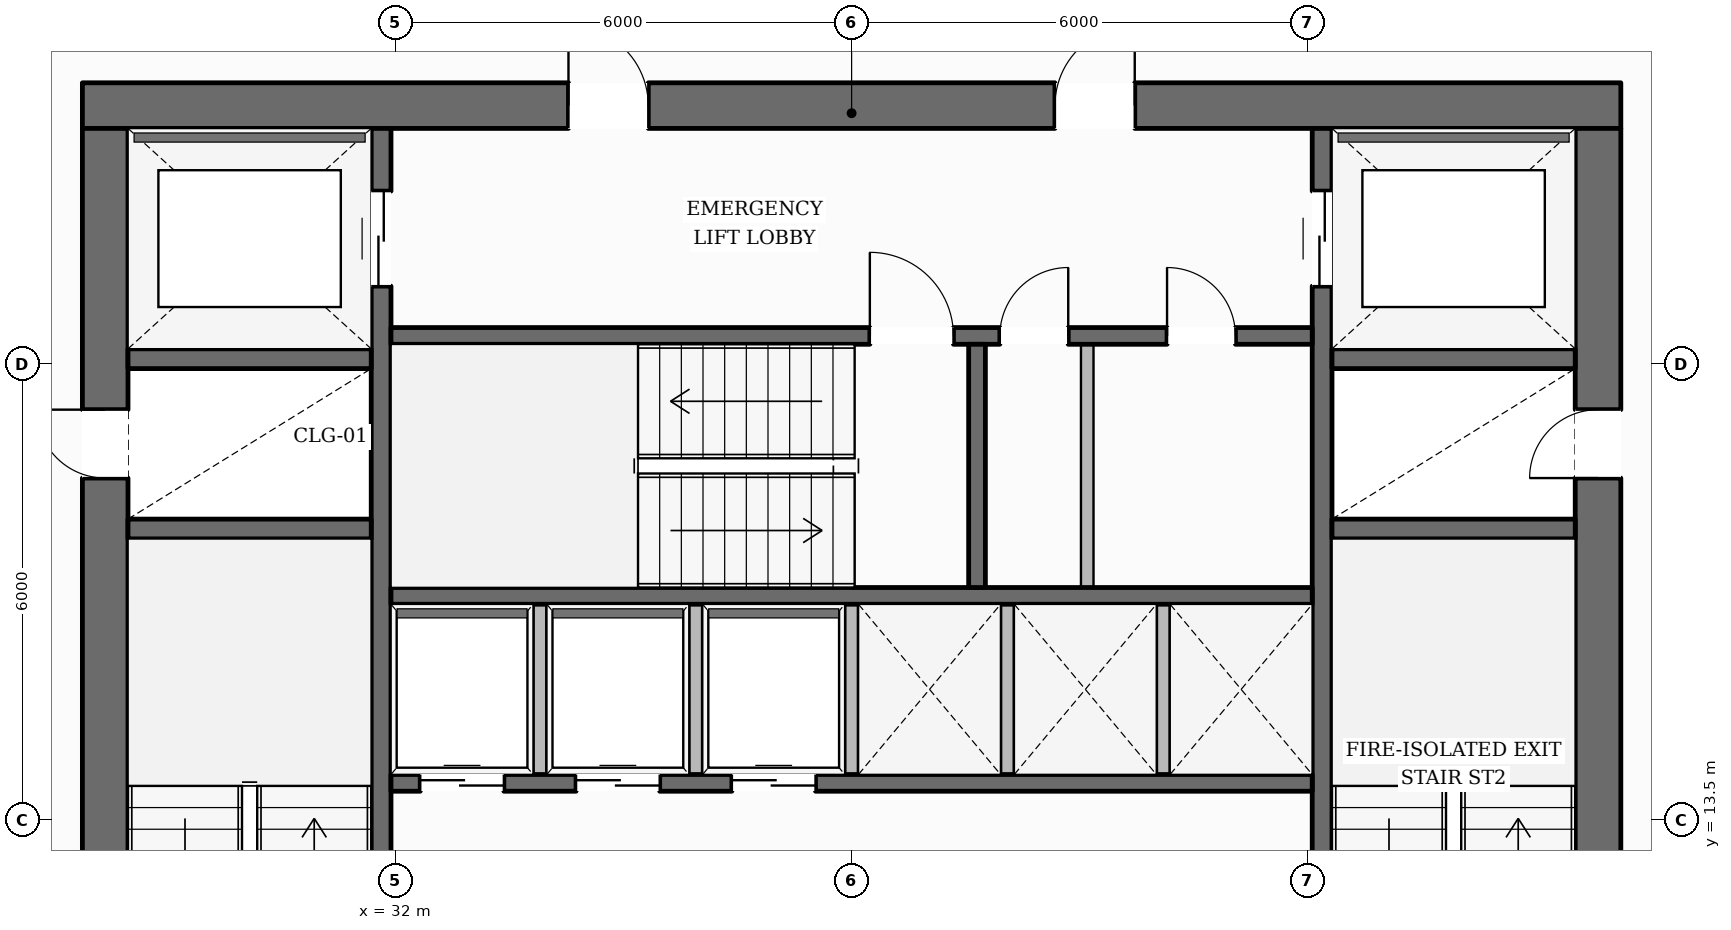
"""IFC4 building model, lengths in metres.
Left out: names, types, materials, properties, quantities, classifications, styles, units other than length and angle.
Written with IfcOpenShell. Run it as: python <this file> out.ifc"""

import sys

from ifc_helpers import new_model, si_unit, direction, frame, frame_2d, origin, place, context, subcontext, project, spatial, rectangle, extrude, element, fill, save


model = new_model("IFC4")
c1 = context("Model", 3, precision=1e-05, world=origin(), true_north=direction((0.0, 1.0)))
c2 = subcontext(c1, "Body", "Model", "MODEL_VIEW")
j1 = project(units=[si_unit("LENGTHUNIT", "METRE"), si_unit("PLANEANGLEUNIT", "RADIAN")], contexts=[c1])
p1 = place(None, origin())
s1 = spatial("IfcSite", under=j1, at=p1, CompositionType="ELEMENT")
p2 = place(p1, origin())
s2 = spatial("IfcBuilding", under=s1, at=p2, CompositionType="ELEMENT")
p3 = place(p2, frame((0.0, 0.0, 48.35)))
s3 = spatial("IfcBuildingStorey", under=s2, at=p3, CompositionType="ELEMENT", Elevation=48.35)
p4 = place(p3, frame((27.88, 22.9, 0.0), z_axis=(0.0, 0.0, 1.0), x_axis=(1.0, 0.0, 0.0)))
e1 = element("IfcWall", 1, at=p4, inside=s3, PredefinedType="SOLIDWALL", context=c2, shape_type="SweptSolid", body=[
    extrude(rectangle(XDim=20.24, YDim=0.6, at=frame_2d((10.12, 0.0))), origin(), (0.0, 0.0, 1.0), 3.59),
])
p5 = place(p4, frame((6.395, 0.0, 0.0)))
e2 = element("IfcOpeningElement", 2, at=p5, cuts=e1, PredefinedType="OPENING", context=c2, shape_type="SweptSolid", body=[
    extrude(rectangle(XDim=1.05, YDim=2.15, at=frame_2d((0.525, 1.075))), frame((0.0, 0.31, 0.0), z_axis=(0.0, -1.0, 0.0), x_axis=(1.0, 0.0, 0.0)), (0.0, 0.0, 1.0), 0.62),
])
p6 = place(p4, frame((12.795, 0.0, 0.0)))
e3 = element("IfcOpeningElement", 3, at=p6, cuts=e1, PredefinedType="OPENING", context=c2, shape_type="SweptSolid", body=[
    extrude(rectangle(XDim=1.05, YDim=2.15, at=frame_2d((0.525, 1.075))), frame((0.0, 0.31, 0.0), z_axis=(0.0, -1.0, 0.0), x_axis=(1.0, 0.0, 0.0)), (0.0, 0.0, 1.0), 0.62),
])
p7 = place(p3, frame((28.18, 9.6, 0.0), z_axis=(0.0, 0.0, 1.0), x_axis=(0.0, 1.0, 0.0)))
e4 = element("IfcWall", 4, at=p7, inside=s3, PredefinedType="SOLIDWALL", context=c2, shape_type="SweptSolid", body=[
    extrude(rectangle(XDim=13.0, YDim=0.6, at=frame_2d((6.5, 0.0))), origin(), (0.0, 0.0, 1.0), 3.59),
])
p8 = place(p7, frame((0.2, 0.0, 0.0)))
e5 = element("IfcOpeningElement", 5, at=p8, cuts=e4, PredefinedType="OPENING", context=c2, shape_type="SweptSolid", body=[
    extrude(rectangle(XDim=1.1, YDim=2.15, at=frame_2d((0.55, 1.075))), frame((0.0, 0.31, 0.0), z_axis=(0.0, -1.0, 0.0), x_axis=(1.0, 0.0, 0.0)), (0.0, 0.0, 1.0), 0.62),
])
p9 = place(p7, frame((8.4, 0.0, 0.0)))
e6 = element("IfcOpeningElement", 6, at=p9, cuts=e4, PredefinedType="OPENING", context=c2, shape_type="SweptSolid", body=[
    extrude(rectangle(XDim=0.9, YDim=2.1, at=frame_2d((0.45, 1.05))), frame((0.0, 0.31, 0.0), z_axis=(0.0, -1.0, 0.0), x_axis=(1.0, 0.0, 0.0)), (0.0, 0.0, 1.0), 0.62),
])
p10 = place(p3, frame((47.82, 9.6, 0.0), z_axis=(0.0, 0.0, 1.0), x_axis=(0.0, 1.0, 0.0)))
e7 = element("IfcWall", 7, at=p10, inside=s3, PredefinedType="SOLIDWALL", context=c2, shape_type="SweptSolid", body=[
    extrude(rectangle(XDim=13.0, YDim=0.6, at=frame_2d((6.5, 0.0))), origin(), (0.0, 0.0, 1.0), 3.59),
])
p11 = place(p10, frame((0.2, 0.0, 0.0)))
e8 = element("IfcOpeningElement", 8, at=p11, cuts=e7, PredefinedType="OPENING", context=c2, shape_type="SweptSolid", body=[
    extrude(rectangle(XDim=1.1, YDim=2.15, at=frame_2d((0.55, 1.075))), frame((0.0, 0.31, 0.0), z_axis=(0.0, -1.0, 0.0), x_axis=(1.0, 0.0, 0.0)), (0.0, 0.0, 1.0), 0.62),
])
p12 = place(p10, frame((8.4, 0.0, 0.0)))
e9 = element("IfcOpeningElement", 9, at=p12, cuts=e7, PredefinedType="OPENING", context=c2, shape_type="SweptSolid", body=[
    extrude(rectangle(XDim=0.9, YDim=2.1, at=frame_2d((0.45, 1.05))), frame((0.0, 0.31, 0.0), z_axis=(0.0, -1.0, 0.0), x_axis=(1.0, 0.0, 0.0)), (0.0, 0.0, 1.0), 0.62),
])
p13 = place(p3, frame((31.81, 9.6, 0.0), z_axis=(0.0, 0.0, 1.0), x_axis=(0.0, 1.0, 0.0)))
e10 = element("IfcWall", 10, at=p13, inside=s3, PredefinedType="SHEAR", context=c2, shape_type="SweptSolid", body=[
    extrude(rectangle(XDim=13.0, YDim=0.26, at=frame_2d((6.5, 0.0))), origin(), (0.0, 0.0, 1.0), 3.59),
])
p14 = place(p13, frame((10.925, 0.0, 0.0)))
e11 = element("IfcOpeningElement", 11, at=p14, cuts=e10, PredefinedType="OPENING", context=c2, shape_type="SweptSolid", body=[
    extrude(rectangle(XDim=1.25, YDim=2.25, at=frame_2d((0.625, 1.125))), frame((0.0, 0.14, 0.0), z_axis=(0.0, -1.0, 0.0), x_axis=(1.0, 0.0, 0.0)), (0.0, 0.0, 1.0), 0.28),
])
p15 = place(p3, frame((44.19, 9.6, 0.0), z_axis=(0.0, 0.0, 1.0), x_axis=(0.0, 1.0, 0.0)))
e12 = element("IfcWall", 12, at=p15, inside=s3, PredefinedType="SHEAR", context=c2, shape_type="SweptSolid", body=[
    extrude(rectangle(XDim=13.0, YDim=0.26, at=frame_2d((6.5, 0.0))), origin(), (0.0, 0.0, 1.0), 3.59),
])
p16 = place(p15, frame((10.925, 0.0, 0.0)))
e13 = element("IfcOpeningElement", 13, at=p16, cuts=e12, PredefinedType="OPENING", context=c2, shape_type="SweptSolid", body=[
    extrude(rectangle(XDim=1.25, YDim=2.25, at=frame_2d((0.625, 1.125))), frame((0.0, 0.14, 0.0), z_axis=(0.0, -1.0, 0.0), x_axis=(1.0, 0.0, 0.0)), (0.0, 0.0, 1.0), 0.28),
])
for number, where, z_axis, x_axis in (
    (14, (28.48, 17.33, 0.0), (0.0, 0.0, 1.0), (1.0, 0.0, 0.0)),
    (15, (28.48, 19.57, 0.0), (0.0, 0.0, 1.0), (1.0, 0.0, 0.0)),
    (16, (44.32, 17.33, 0.0), (0.0, 0.0, 1.0), (1.0, 0.0, 0.0)),
    (17, (44.32, 19.57, 0.0), (0.0, 0.0, 1.0), (1.0, 0.0, 0.0)),
):
    element("IfcWall", number, at=place(p3, frame(where, z_axis=z_axis, x_axis=x_axis)), inside=s3, PredefinedType="SHEAR", context=c2, shape_type="SweptSolid", body=[
        extrude(rectangle(XDim=3.2, YDim=0.26, at=frame_2d((1.6, 0.0))), origin(), (0.0, 0.0, 1.0), 3.59),
    ])
p17 = place(p3, frame((31.94, 19.87, 0.0), z_axis=(0.0, 0.0, 1.0), x_axis=(1.0, 0.0, 0.0)))
e18 = element("IfcWall", 18, at=p17, inside=s3, PredefinedType="SOLIDWALL", context=c2, shape_type="SweptSolid", body=[
    extrude(rectangle(XDim=12.12, YDim=0.22, at=frame_2d((6.06, 0.0))), origin(), (0.0, 0.0, 1.0), 3.59),
])
p18 = place(p17, frame((6.3, 0.0, 0.0)))
e19 = element("IfcOpeningElement", 19, at=p18, cuts=e18, PredefinedType="OPENING", context=c2, shape_type="SweptSolid", body=[
    extrude(rectangle(XDim=1.1, YDim=2.15, at=frame_2d((0.55, 1.075))), frame((0.0, 0.12, 0.0), z_axis=(0.0, -1.0, 0.0), x_axis=(1.0, 0.0, 0.0)), (0.0, 0.0, 1.0), 0.24),
])
p19 = place(p17, frame((8.01, 0.0, 0.0)))
e20 = element("IfcOpeningElement", 20, at=p19, cuts=e18, PredefinedType="OPENING", context=c2, shape_type="SweptSolid", body=[
    extrude(rectangle(XDim=0.9, YDim=2.1, at=frame_2d((0.45, 1.05))), frame((0.0, 0.12, 0.0), z_axis=(0.0, -1.0, 0.0), x_axis=(1.0, 0.0, 0.0)), (0.0, 0.0, 1.0), 0.24),
])
p20 = place(p17, frame((10.21, 0.0, 0.0)))
e21 = element("IfcOpeningElement", 21, at=p20, cuts=e18, PredefinedType="OPENING", context=c2, shape_type="SweptSolid", body=[
    extrude(rectangle(XDim=0.9, YDim=2.1, at=frame_2d((0.45, 1.05))), frame((0.0, 0.12, 0.0), z_axis=(0.0, -1.0, 0.0), x_axis=(1.0, 0.0, 0.0)), (0.0, 0.0, 1.0), 0.24),
])
p21 = place(p3, frame((31.94, 16.45, 0.0), z_axis=(0.0, 0.0, 1.0), x_axis=(1.0, 0.0, 0.0)))
e22 = element("IfcWall", 22, at=p21, inside=s3, PredefinedType="SOLIDWALL", context=c2, shape_type="SweptSolid", body=[
    extrude(rectangle(XDim=12.12, YDim=0.22, at=frame_2d((6.06, 0.0))), origin(), (0.0, 0.0, 1.0), 3.59),
])
p22 = place(p3, frame((39.65, 16.56, 0.0), z_axis=(0.0, 0.0, 1.0), x_axis=(0.0, 1.0, 0.0)))
e23 = element("IfcWall", 23, at=p22, inside=s3, PredefinedType="SOLIDWALL", context=c2, shape_type="SweptSolid", body=[
    extrude(rectangle(XDim=3.2, YDim=0.22, at=frame_2d((1.6, 0.0))), origin(), (0.0, 0.0, 1.0), 3.59),
])
p23 = place(p3, frame((31.94, 13.99, 0.0), z_axis=(0.0, 0.0, 1.0), x_axis=(1.0, 0.0, 0.0)))
e24 = element("IfcWall", 24, at=p23, inside=s3, PredefinedType="SOLIDWALL", context=c2, shape_type="SweptSolid", body=[
    extrude(rectangle(XDim=12.12, YDim=0.22, at=frame_2d((6.06, 0.0))), origin(), (0.0, 0.0, 1.0), 3.59),
])
p24 = place(p23, frame((0.385, 0.0, 0.0)))
e25 = element("IfcOpeningElement", 25, at=p24, cuts=e24, PredefinedType="OPENING", context=c2, shape_type="SweptSolid", body=[
    extrude(rectangle(XDim=1.1, YDim=2.2, at=frame_2d((0.55, 1.1))), frame((0.0, 0.12, 0.0), z_axis=(0.0, -1.0, 0.0), x_axis=(1.0, 0.0, 0.0)), (0.0, 0.0, 1.0), 0.24),
])
p25 = place(p23, frame((2.435, 0.0, 0.0)))
e26 = element("IfcOpeningElement", 26, at=p25, cuts=e24, PredefinedType="OPENING", context=c2, shape_type="SweptSolid", body=[
    extrude(rectangle(XDim=1.1, YDim=2.2, at=frame_2d((0.55, 1.1))), frame((0.0, 0.12, 0.0), z_axis=(0.0, -1.0, 0.0), x_axis=(1.0, 0.0, 0.0)), (0.0, 0.0, 1.0), 0.24),
])
p26 = place(p23, frame((4.485, 0.0, 0.0)))
e27 = element("IfcOpeningElement", 27, at=p26, cuts=e24, PredefinedType="OPENING", context=c2, shape_type="SweptSolid", body=[
    extrude(rectangle(XDim=1.1, YDim=2.2, at=frame_2d((0.55, 1.1))), frame((0.0, 0.12, 0.0), z_axis=(0.0, -1.0, 0.0), x_axis=(1.0, 0.0, 0.0)), (0.0, 0.0, 1.0), 0.24),
])
p27 = place(p3, frame((13.156, 14.237, 0.0), z_axis=(0.0, 0.0, 1.0), x_axis=(0.499310189151, 0.866423300131, 0.0)))
e28 = element("IfcWall", 28, at=p27, inside=s3, PredefinedType="STANDARD", context=c2, shape_type="SweptSolid", body=[
    extrude(rectangle(XDim=34.917, YDim=0.38, at=frame_2d((17.458, 0.0))), origin(), (0.0, 0.0, 1.0), 2.97),
])
p28 = place(p27, frame((25.588, 0.0, 0.0)))
e29 = element("IfcOpeningElement", 29, at=p28, cuts=e28, PredefinedType="OPENING", context=c2, shape_type="SweptSolid", body=[
    extrude(rectangle(XDim=1.0, YDim=2.2, at=frame_2d((0.5, 1.1))), frame((0.0, 0.2, 0.0), z_axis=(0.0, -1.0, 0.0), x_axis=(1.0, 0.0, 0.0)), (0.0, 0.0, 1.0), 0.4),
])
p29 = place(p27, frame((30.783, 0.0, 0.65)))
e30 = element("IfcOpeningElement", 30, at=p29, cuts=e28, PredefinedType="OPENING", context=c2, shape_type="SweptSolid", body=[
    extrude(rectangle(XDim=1.65, YDim=1.75, at=frame_2d((0.825, 0.875))), frame((0.0, 0.2, 0.0), z_axis=(0.0, -1.0, 0.0), x_axis=(1.0, 0.0, 0.0)), (0.0, 0.0, 1.0), 0.4),
])
p30 = place(p27, frame((8.143, 0.0, 0.65)))
e31 = element("IfcOpeningElement", 31, at=p30, cuts=e28, PredefinedType="OPENING", context=c2, shape_type="SweptSolid", body=[
    extrude(rectangle(XDim=1.65, YDim=1.75, at=frame_2d((0.825, 0.875))), frame((0.0, 0.2, 0.0), z_axis=(0.0, -1.0, 0.0), x_axis=(1.0, 0.0, 0.0)), (0.0, 0.0, 1.0), 0.4),
])
p31 = place(p27, frame((2.483, 0.0, 0.65)))
e32 = element("IfcOpeningElement", 32, at=p31, cuts=e28, PredefinedType="OPENING", context=c2, shape_type="SweptSolid", body=[
    extrude(rectangle(XDim=1.65, YDim=1.75, at=frame_2d((0.825, 0.875))), frame((0.0, 0.2, 0.0), z_axis=(0.0, -1.0, 0.0), x_axis=(1.0, 0.0, 0.0)), (0.0, 0.0, 1.0), 0.4),
])
p32 = place(p3, frame((45.56, 44.402, 0.0), z_axis=(0.0, 0.0, 1.0), x_axis=(0.504140111044, -0.86362187816, 0.0)))
e33 = element("IfcWall", 33, at=p32, inside=s3, PredefinedType="STANDARD", context=c2, shape_type="SweptSolid", body=[
    extrude(rectangle(XDim=35.254, YDim=0.38, at=frame_2d((17.627, 0.0))), origin(), (0.0, 0.0, 1.0), 2.97),
])
p33 = place(p32, frame((31.093, 0.0, 0.65)))
e34 = element("IfcOpeningElement", 34, at=p33, cuts=e33, PredefinedType="OPENING", context=c2, shape_type="SweptSolid", body=[
    extrude(rectangle(XDim=1.65, YDim=1.75, at=frame_2d((0.825, 0.875))), frame((0.0, 0.2, 0.0), z_axis=(0.0, -1.0, 0.0), x_axis=(1.0, 0.0, 0.0)), (0.0, 0.0, 1.0), 0.4),
])
p34 = place(p32, frame((25.375, 0.0, 0.65)))
e35 = element("IfcOpeningElement", 35, at=p34, cuts=e33, PredefinedType="OPENING", context=c2, shape_type="SweptSolid", body=[
    extrude(rectangle(XDim=1.65, YDim=1.75, at=frame_2d((0.825, 0.875))), frame((0.0, 0.2, 0.0), z_axis=(0.0, -1.0, 0.0), x_axis=(1.0, 0.0, 0.0)), (0.0, 0.0, 1.0), 0.4),
])
p35 = place(p32, frame((19.658, 0.0, 0.65)))
e36 = element("IfcOpeningElement", 36, at=p35, cuts=e33, PredefinedType="OPENING", context=c2, shape_type="SweptSolid", body=[
    extrude(rectangle(XDim=1.65, YDim=1.75, at=frame_2d((0.825, 0.875))), frame((0.0, 0.2, 0.0), z_axis=(0.0, -1.0, 0.0), x_axis=(1.0, 0.0, 0.0)), (0.0, 0.0, 1.0), 0.4),
])
p36 = place(p32, frame((8.224, 0.0, 0.65)))
e37 = element("IfcOpeningElement", 37, at=p36, cuts=e33, PredefinedType="OPENING", context=c2, shape_type="SweptSolid", body=[
    extrude(rectangle(XDim=1.65, YDim=1.75, at=frame_2d((0.825, 0.875))), frame((0.0, 0.2, 0.0), z_axis=(0.0, -1.0, 0.0), x_axis=(1.0, 0.0, 0.0)), (0.0, 0.0, 1.0), 0.4),
])
p37 = place(p32, frame((2.507, 0.0, 0.65)))
e38 = element("IfcOpeningElement", 38, at=p37, cuts=e33, PredefinedType="OPENING", context=c2, shape_type="SweptSolid", body=[
    extrude(rectangle(XDim=1.65, YDim=1.75, at=frame_2d((0.825, 0.875))), frame((0.0, 0.2, 0.0), z_axis=(0.0, -1.0, 0.0), x_axis=(1.0, 0.0, 0.0)), (0.0, 0.0, 1.0), 0.4),
])
for number, where, z_axis, x_axis in (
    (39, (33.9, 14.1, 0.0), (0.0, 0.0, 1.0), (0.0, 1.0, 0.0)),
    (40, (35.95, 14.1, 0.0), (0.0, 0.0, 1.0), (0.0, 1.0, 0.0)),
    (41, (38.0, 14.1, 0.0), (0.0, 0.0, 1.0), (0.0, 1.0, 0.0)),
    (42, (40.05, 14.1, 0.0), (0.0, 0.0, 1.0), (0.0, 1.0, 0.0)),
    (43, (42.1, 14.1, 0.0), (0.0, 0.0, 1.0), (0.0, 1.0, 0.0)),
):
    element("IfcWall", number, at=place(p3, frame(where, z_axis=z_axis, x_axis=x_axis)), inside=s3, PredefinedType="PARTITIONING", context=c2, shape_type="SweptSolid", body=[
        extrude(rectangle(XDim=2.24, YDim=0.165, at=frame_2d((1.12, 0.0))), origin(), (0.0, 0.0, 1.0), 3.59),
    ])
p38 = place(p3, frame((41.1, 16.56, 0.0), z_axis=(0.0, 0.0, 1.0), x_axis=(0.0, 1.0, 0.0)))
e44 = element("IfcWall", 44, at=p38, inside=s3, PredefinedType="PARTITIONING", context=c2, shape_type="SweptSolid", body=[
    extrude(rectangle(XDim=3.2, YDim=0.165, at=frame_2d((1.6, 0.0))), origin(), (0.0, 0.0, 1.0), 3.59),
])
p39 = place(p18, origin())
e45 = element("IfcDoor", 45, at=p39, inside=s3, OperationType="SINGLE_SWING_LEFT", PredefinedType="DOOR", context=c2, shape_type="SweptSolid", body=[
    extrude(rectangle(XDim=1.1, YDim=2.15, at=frame_2d((0.55, 1.075))), frame((0.0, 0.025, 0.0), z_axis=(0.0, -1.0, 0.0), x_axis=(1.0, 0.0, 0.0)), (0.0, 0.0, 1.0), 0.05),
])
fill(e19, e45)
p40 = place(p9, origin())
e46 = element("IfcDoor", 46, at=p40, inside=s3, OperationType="SINGLE_SWING_RIGHT", PredefinedType="DOOR", context=c2, shape_type="SweptSolid", body=[
    extrude(rectangle(XDim=0.9, YDim=2.1, at=frame_2d((0.45, 1.05))), frame((0.0, 0.025, 0.0), z_axis=(0.0, -1.0, 0.0), x_axis=(1.0, 0.0, 0.0)), (0.0, 0.0, 1.0), 0.05),
])
fill(e6, e46)
p41 = place(p12, origin())
e47 = element("IfcDoor", 47, at=p41, inside=s3, OperationType="SINGLE_SWING_LEFT", PredefinedType="DOOR", context=c2, shape_type="SweptSolid", body=[
    extrude(rectangle(XDim=0.9, YDim=2.1, at=frame_2d((0.45, 1.05))), frame((0.0, 0.025, 0.0), z_axis=(0.0, -1.0, 0.0), x_axis=(1.0, 0.0, 0.0)), (0.0, 0.0, 1.0), 0.05),
])
fill(e9, e47)
p42 = place(p5, origin())
e48 = element("IfcDoor", 48, at=p42, inside=s3, OperationType="SINGLE_SWING_LEFT", PredefinedType="DOOR", context=c2, shape_type="SweptSolid", body=[
    extrude(rectangle(XDim=1.05, YDim=2.15, at=frame_2d((0.525, 1.075))), frame((0.0, 0.025, 0.0), z_axis=(0.0, -1.0, 0.0), x_axis=(1.0, 0.0, 0.0)), (0.0, 0.0, 1.0), 0.05),
])
fill(e2, e48)
p43 = place(p6, origin())
e49 = element("IfcDoor", 49, at=p43, inside=s3, OperationType="SINGLE_SWING_RIGHT", PredefinedType="DOOR", context=c2, shape_type="SweptSolid", body=[
    extrude(rectangle(XDim=1.05, YDim=2.15, at=frame_2d((0.525, 1.075))), frame((0.0, 0.025, 0.0), z_axis=(0.0, -1.0, 0.0), x_axis=(1.0, 0.0, 0.0)), (0.0, 0.0, 1.0), 0.05),
])
fill(e3, e49)
p44 = place(p14, origin())
e50 = element("IfcDoor", 50, at=p44, inside=s3, OperationType="DOUBLE_DOOR_SLIDING", PredefinedType="DOOR", context=c2, shape_type="SweptSolid", body=[
    extrude(rectangle(XDim=1.25, YDim=2.25, at=frame_2d((0.625, 1.125))), frame((0.0, 0.025, 0.0), z_axis=(0.0, -1.0, 0.0), x_axis=(1.0, 0.0, 0.0)), (0.0, 0.0, 1.0), 0.05),
])
fill(e11, e50)
p45 = place(p16, origin())
e51 = element("IfcDoor", 51, at=p45, inside=s3, OperationType="DOUBLE_DOOR_SLIDING", PredefinedType="DOOR", context=c2, shape_type="SweptSolid", body=[
    extrude(rectangle(XDim=1.25, YDim=2.25, at=frame_2d((0.625, 1.125))), frame((0.0, 0.025, 0.0), z_axis=(0.0, -1.0, 0.0), x_axis=(1.0, 0.0, 0.0)), (0.0, 0.0, 1.0), 0.05),
])
fill(e13, e51)
p46 = place(p24, origin())
e52 = element("IfcDoor", 52, at=p46, inside=s3, OperationType="DOUBLE_DOOR_SLIDING", PredefinedType="DOOR", context=c2, shape_type="SweptSolid", body=[
    extrude(rectangle(XDim=1.1, YDim=2.2, at=frame_2d((0.55, 1.1))), frame((0.0, 0.025, 0.0), z_axis=(0.0, -1.0, 0.0), x_axis=(1.0, 0.0, 0.0)), (0.0, 0.0, 1.0), 0.05),
])
fill(e25, e52)
p47 = place(p25, origin())
e53 = element("IfcDoor", 53, at=p47, inside=s3, OperationType="DOUBLE_DOOR_SLIDING", PredefinedType="DOOR", context=c2, shape_type="SweptSolid", body=[
    extrude(rectangle(XDim=1.1, YDim=2.2, at=frame_2d((0.55, 1.1))), frame((0.0, 0.025, 0.0), z_axis=(0.0, -1.0, 0.0), x_axis=(1.0, 0.0, 0.0)), (0.0, 0.0, 1.0), 0.05),
])
fill(e26, e53)
p48 = place(p26, origin())
e54 = element("IfcDoor", 54, at=p48, inside=s3, OperationType="DOUBLE_DOOR_SLIDING", PredefinedType="DOOR", context=c2, shape_type="SweptSolid", body=[
    extrude(rectangle(XDim=1.1, YDim=2.2, at=frame_2d((0.55, 1.1))), frame((0.0, 0.025, 0.0), z_axis=(0.0, -1.0, 0.0), x_axis=(1.0, 0.0, 0.0)), (0.0, 0.0, 1.0), 0.05),
])
fill(e27, e54)
p49 = place(p19, origin())
e55 = element("IfcDoor", 55, at=p49, inside=s3, OperationType="SINGLE_SWING_RIGHT", PredefinedType="DOOR", context=c2, shape_type="SweptSolid", body=[
    extrude(rectangle(XDim=0.9, YDim=2.1, at=frame_2d((0.45, 1.05))), frame((0.0, 0.025, 0.0), z_axis=(0.0, -1.0, 0.0), x_axis=(1.0, 0.0, 0.0)), (0.0, 0.0, 1.0), 0.05),
])
fill(e20, e55)
p50 = place(p20, origin())
e56 = element("IfcDoor", 56, at=p50, inside=s3, OperationType="SINGLE_SWING_LEFT", PredefinedType="DOOR", context=c2, shape_type="SweptSolid", body=[
    extrude(rectangle(XDim=0.9, YDim=2.1, at=frame_2d((0.45, 1.05))), frame((0.0, 0.025, 0.0), z_axis=(0.0, -1.0, 0.0), x_axis=(1.0, 0.0, 0.0)), (0.0, 0.0, 1.0), 0.05),
])
fill(e21, e56)
save(model, sys.argv[1])
